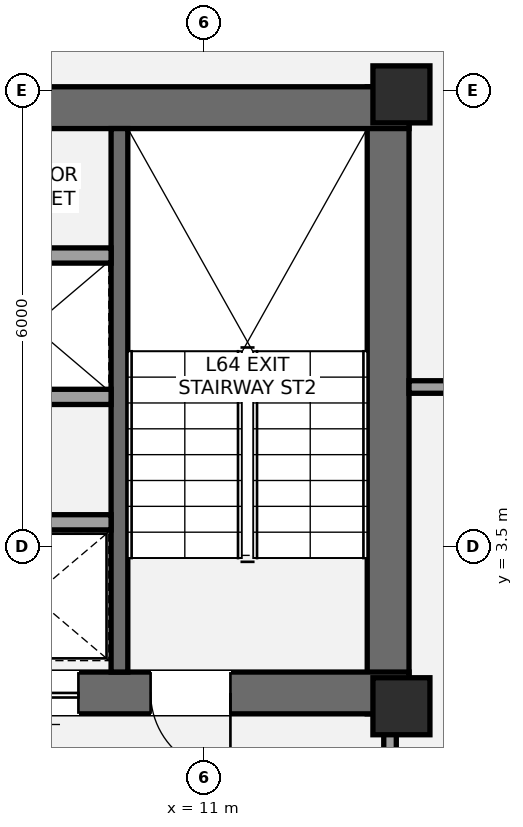
"""IFC4 building model, lengths in metres.
Left out: names, types, materials, properties, quantities, classifications, styles, units other than length and angle.
Written with IfcOpenShell. Run it as: python <this file> out.ifc"""

import sys

from ifc_helpers import new_model, si_unit, direction, frame, frame_2d, origin, origin_2d, place, context, subcontext, project, spatial, rectangle, extrude, element, fill, save


model = new_model("IFC4")
c1 = context("Model", 3, precision=1e-05, world=origin(), true_north=direction((0.0, 1.0)))
c2 = subcontext(c1, "Body", "Model", "MODEL_VIEW")
j1 = project(units=[si_unit("LENGTHUNIT", "METRE"), si_unit("PLANEANGLEUNIT", "RADIAN")], contexts=[c1])
p1 = place(None, origin())
s1 = spatial("IfcSite", under=j1, at=p1, CompositionType="ELEMENT")
p2 = place(p1, origin())
s2 = spatial("IfcBuilding", under=s1, at=p2, CompositionType="ELEMENT")
p3 = place(p2, frame((0.0, 0.0, 228.9)))
s3 = spatial("IfcBuildingStorey", under=s2, at=p3, CompositionType="ELEMENT", Elevation=228.9)
p4 = place(p3, frame((13.425, 1.3, 0.0), z_axis=(0.0, 0.0, 1.0), x_axis=(0.0, 1.0, 0.0)))
e1 = element("IfcWall", 1, at=p4, inside=s3, PredefinedType="SHEAR", context=c2, shape_type="SweptSolid", body=[
    extrude(rectangle(XDim=8.25, YDim=0.55, at=frame_2d((4.125, 0.0))), origin(), (0.0, 0.0, 1.0), 3.15),
])
p5 = place(p3, frame((4.525, 9.275, 0.0), z_axis=(0.0, 0.0, 1.0), x_axis=(1.0, 0.0, 0.0)))
e2 = element("IfcWall", 2, at=p5, inside=s3, PredefinedType="SHEAR", context=c2, shape_type="SweptSolid", body=[
    extrude(rectangle(XDim=9.175, YDim=0.55, at=frame_2d((4.587, 0.0))), origin(), (0.0, 0.0, 1.0), 3.15),
])
p6 = place(p3, frame((13.7, 1.575, 0.0), z_axis=(0.0, 0.0, 1.0), x_axis=(-1.0, 0.0, 0.0)))
e3 = element("IfcWall", 3, at=p6, inside=s3, PredefinedType="SHEAR", context=c2, shape_type="SweptSolid", body=[
    extrude(rectangle(XDim=8.775, YDim=0.55, at=frame_2d((4.387, 0.0))), origin(), (0.0, 0.0, 1.0), 3.15),
])
p7 = place(p6, frame((2.35, 0.0, 0.0)))
e4 = element("IfcOpeningElement", 4, at=p7, cuts=e3, PredefinedType="OPENING", context=c2, shape_type="SweptSolid", body=[
    extrude(rectangle(XDim=1.05, YDim=2.15, at=frame_2d((0.525, 1.075))), frame((0.0, 0.285, 0.0), z_axis=(0.0, -1.0, 0.0), x_axis=(1.0, 0.0, 0.0)), (0.0, 0.0, 1.0), 0.57),
])
p8 = place(p6, frame((4.35, 0.0, 0.0)))
e5 = element("IfcOpeningElement", 5, at=p8, cuts=e3, PredefinedType="OPENING", context=c2, shape_type="SweptSolid", body=[
    extrude(rectangle(XDim=1.1, YDim=2.2, at=frame_2d((0.55, 1.1))), frame((0.0, 0.285, 0.0), z_axis=(0.0, -1.0, 0.0), x_axis=(1.0, 0.0, 0.0)), (0.0, 0.0, 1.0), 0.57),
])
p9 = place(p3, frame((9.89, 1.85, 0.0), z_axis=(0.0, 0.0, 1.0), x_axis=(0.0, 1.0, 0.0)))
e6 = element("IfcWall", 6, at=p9, inside=s3, PredefinedType="SHEAR", context=c2, shape_type="SweptSolid", body=[
    extrude(rectangle(XDim=7.15, YDim=0.22, at=frame_2d((3.575, 0.0))), origin(), (0.0, 0.0, 1.0), 3.15),
])
for number, where, z_axis, x_axis in (
    (7, (13.6, 1.4, 0.0), (0.0, 0.0, 1.0), (1.0, 0.0, 0.0)),
    (8, (13.6, 9.45, 0.0), (0.0, 0.0, 1.0), (1.0, 0.0, 0.0)),
):
    element("IfcColumn", number, at=place(p3, frame(where, z_axis=z_axis, x_axis=x_axis)), inside=s3, PredefinedType="PILASTER", context=c2, shape_type="SweptSolid", body=[
        extrude(rectangle(XDim=0.75, YDim=0.75, at=origin_2d()), origin(), (0.0, 0.0, 1.0), 3.15),
    ])
p10 = place(p3, frame((14.117, 11.585, 0.0), z_axis=(0.0, 0.0, 1.0), x_axis=(0.827638454008, -0.561261605178, 0.0)))
e9 = element("IfcWall", 9, at=p10, inside=s3, PredefinedType="STANDARD", context=c2, shape_type="SweptSolid", body=[
    extrude(rectangle(XDim=3.76, YDim=0.44, at=frame_2d((1.88, 0.0))), origin(), (0.0, 0.0, 1.0), 2.336),
])
p11 = place(p10, frame((0.249, 0.0, 0.42)))
e10 = element("IfcOpeningElement", 10, at=p11, cuts=e9, PredefinedType="OPENING", context=c2, shape_type="SweptSolid", body=[
    extrude(rectangle(XDim=0.9, YDim=1.35, at=frame_2d((0.45, 0.675))), frame((0.0, 0.23, 0.0), z_axis=(0.0, -1.0, 0.0), x_axis=(1.0, 0.0, 0.0)), (0.0, 0.0, 1.0), 0.46),
])
p12 = place(p3, frame((13.45, -2.15, 0.0), z_axis=(0.0, 0.0, 1.0), x_axis=(0.0, 1.0, 0.0)))
e11 = element("IfcWall", 11, at=p12, inside=s3, PredefinedType="PARTITIONING", context=c2, shape_type="SweptSolid", body=[
    extrude(rectangle(XDim=3.5, YDim=0.165, at=frame_2d((1.75, 0.0))), origin(), (0.0, 0.0, 1.0), 2.423),
])
p13 = place(p12, frame((0.67, 0.0, 0.0)))
e12 = element("IfcOpeningElement", 12, at=p13, cuts=e11, PredefinedType="OPENING", context=c2, shape_type="SweptSolid", body=[
    extrude(rectangle(XDim=1.05, YDim=2.15, at=frame_2d((0.525, 1.075))), frame((0.0, 0.093, 0.0), z_axis=(0.0, -1.0, 0.0), x_axis=(1.0, 0.0, 0.0)), (0.0, 0.0, 1.0), 0.185),
])
p14 = place(p3, frame((5.475, 3.82, 0.0), z_axis=(0.0, 0.0, 1.0), x_axis=(1.0, 0.0, 0.0)))
e13 = element("IfcWall", 13, at=p14, inside=s3, PredefinedType="SOLIDWALL", context=c2, shape_type="SweptSolid", body=[
    extrude(rectangle(XDim=4.305, YDim=0.2, at=frame_2d((2.152, 0.0))), origin(), (0.0, 0.0, 1.0), 2.97),
])
p15 = place(p14, frame((0.65, 0.0, 0.0)))
e14 = element("IfcOpeningElement", 14, at=p15, cuts=e13, PredefinedType="OPENING", context=c2, shape_type="SweptSolid", body=[
    extrude(rectangle(XDim=1.2, YDim=2.2, at=frame_2d((0.6, 1.1))), frame((0.0, 0.11, 0.0), z_axis=(0.0, -1.0, 0.0), x_axis=(1.0, 0.0, 0.0)), (0.0, 0.0, 1.0), 0.22),
])
for number, where, z_axis, x_axis in (
    (15, (5.475, 5.47, 0.0), (0.0, 0.0, 1.0), (1.0, 0.0, 0.0)),
    (16, (5.475, 7.33, 0.0), (0.0, 0.0, 1.0), (1.0, 0.0, 0.0)),
):
    element("IfcWall", number, at=place(p3, frame(where, z_axis=z_axis, x_axis=x_axis)), inside=s3, PredefinedType="SOLIDWALL", context=c2, shape_type="SweptSolid", body=[
        extrude(rectangle(XDim=4.305, YDim=0.2, at=frame_2d((2.152, 0.0))), origin(), (0.0, 0.0, 1.0), 2.97),
    ])
p16 = place(p3, frame((13.7, 5.6, 0.0), z_axis=(0.0, 0.0, 1.0), x_axis=(1.0, 0.0, 0.0)))
e17 = element("IfcWall", 17, at=p16, inside=s3, PredefinedType="PARTITIONING", context=c2, shape_type="SweptSolid", body=[
    extrude(rectangle(XDim=6.612, YDim=0.165, at=frame_2d((3.306, 0.0))), origin(), (0.0, 0.0, 1.0), 2.423),
])
p17 = place(p16, frame((3.25, 0.0, 0.0)))
e18 = element("IfcOpeningElement", 18, at=p17, cuts=e17, PredefinedType="OPENING", context=c2, shape_type="SweptSolid", body=[
    extrude(rectangle(XDim=0.9, YDim=2.1, at=frame_2d((0.45, 1.05))), frame((0.0, 0.093, 0.0), z_axis=(0.0, -1.0, 0.0), x_axis=(1.0, 0.0, 0.0)), (0.0, 0.0, 1.0), 0.185),
])
p18 = place(p7, origin())
e19 = element("IfcDoor", 19, at=p18, inside=s3, OperationType="SINGLE_SWING_LEFT", PredefinedType="DOOR", context=c2, shape_type="SweptSolid", body=[
    extrude(rectangle(XDim=1.05, YDim=2.15, at=frame_2d((0.525, 1.075))), frame((0.0, 0.025, 0.0), z_axis=(0.0, -1.0, 0.0), x_axis=(1.0, 0.0, 0.0)), (0.0, 0.0, 1.0), 0.05),
])
fill(e4, e19)
p19 = place(p8, origin())
e20 = element("IfcDoor", 20, at=p19, inside=s3, OperationType="SLIDING_TO_LEFT", PredefinedType="DOOR", context=c2, shape_type="SweptSolid", body=[
    extrude(rectangle(XDim=1.1, YDim=2.2, at=frame_2d((0.55, 1.1))), frame((0.0, 0.025, 0.0), z_axis=(0.0, -1.0, 0.0), x_axis=(1.0, 0.0, 0.0)), (0.0, 0.0, 1.0), 0.05),
])
fill(e5, e20)
save(model, sys.argv[1])
